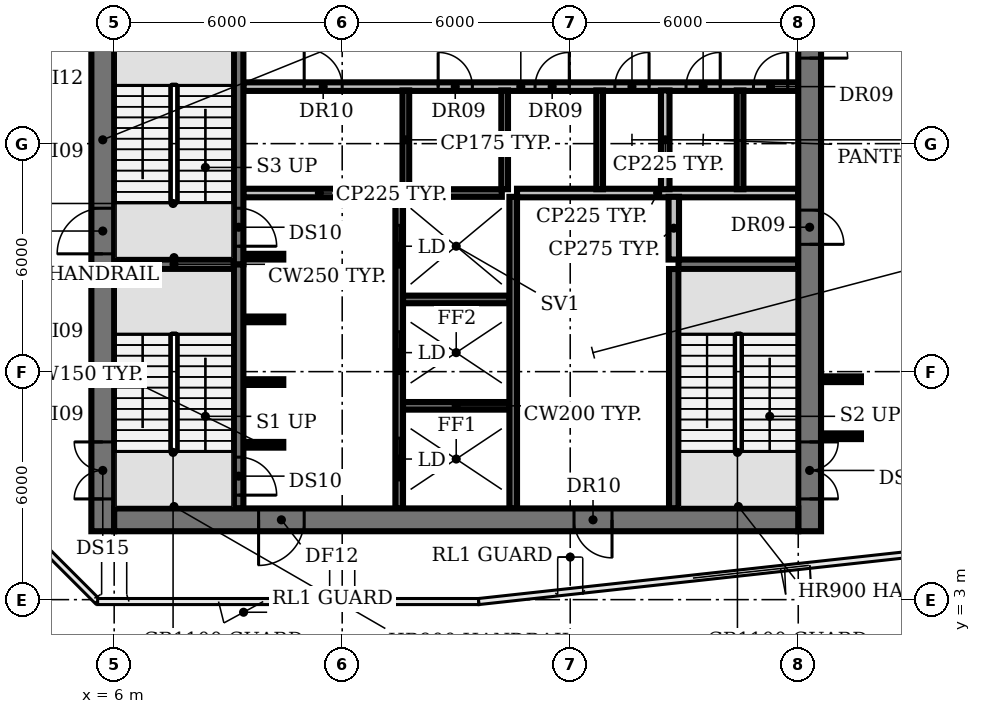
"""IFC4 building model, lengths in metres.
Left out: names, types, materials, properties, quantities, classifications, styles, units other than length and angle.
Written with IfcOpenShell. Run it as: python <this file> out.ifc"""

import sys

from ifc_helpers import new_model, si_unit, direction, frame, frame_2d, origin, place, context, subcontext, project, spatial, rectangle, extrude, element, fill, save


model = new_model("IFC4")
c1 = context("Model", 3, precision=1e-05, world=origin(), true_north=direction((0.0, 1.0)))
c2 = subcontext(c1, "Body", "Model", "MODEL_VIEW")
j1 = project(units=[si_unit("LENGTHUNIT", "METRE"), si_unit("PLANEANGLEUNIT", "RADIAN")], contexts=[c1])
p1 = place(None, origin())
s1 = spatial("IfcSite", under=j1, at=p1, CompositionType="ELEMENT")
p2 = place(p1, origin())
s2 = spatial("IfcBuilding", under=s1, at=p2, CompositionType="ELEMENT")
p3 = place(p2, frame((0.0, 0.0, 197.0)))
s3 = spatial("IfcBuildingStorey", under=s2, at=p3, CompositionType="ELEMENT", Elevation=197.0)
p4 = place(p3, frame((9.4, 7.075, 0.0), z_axis=(0.0, 0.0, 1.0), x_axis=(1.0, 0.0, 0.0)))
e1 = element("IfcWall", 1, at=p4, inside=s3, PredefinedType="SHEAR", context=c2, shape_type="SweptSolid", body=[
    extrude(rectangle(XDim=1.05, YDim=0.15, at=frame_2d((0.525, 0.0))), origin(), (0.0, 0.0, 1.0), 8.05),
])
p5 = place(p3, frame((13.6, 8.1, 0.0), z_axis=(0.0, 0.0, 1.0), x_axis=(1.0, 0.0, 0.0)))
e2 = element("IfcWall", 2, at=p5, inside=s3, PredefinedType="SHEAR", context=c2, shape_type="SweptSolid", body=[
    extrude(rectangle(XDim=2.8, YDim=0.2, at=frame_2d((1.4, 0.0))), origin(), (0.0, 0.0, 1.0), 8.05),
])
for number, where, z_axis, x_axis in (
    (3, (9.4, 8.725, 0.0), (0.0, 0.0, 1.0), (1.0, 0.0, 0.0)),
    (4, (9.4, 10.375, 0.0), (0.0, 0.0, 1.0), (1.0, 0.0, 0.0)),
):
    element("IfcWall", number, at=place(p3, frame(where, z_axis=z_axis, x_axis=x_axis)), inside=s3, PredefinedType="SHEAR", context=c2, shape_type="SweptSolid", body=[
        extrude(rectangle(XDim=1.05, YDim=0.15, at=frame_2d((0.525, 0.0))), origin(), (0.0, 0.0, 1.0), 8.05),
    ])
p6 = place(p3, frame((13.6, 10.9, 0.0), z_axis=(0.0, 0.0, 1.0), x_axis=(1.0, 0.0, 0.0)))
e5 = element("IfcWall", 5, at=p6, inside=s3, PredefinedType="SHEAR", context=c2, shape_type="SweptSolid", body=[
    extrude(rectangle(XDim=2.8, YDim=0.2, at=frame_2d((1.4, 0.0))), origin(), (0.0, 0.0, 1.0), 8.05),
])
for number, where, z_axis, x_axis in (
    (6, (6.0, 11.825, 0.0), (0.0, 0.0, 1.0), (1.0, 0.0, 0.0)),
    (7, (20.85, 11.825, 0.0), (0.0, 0.0, 1.0), (1.0, 0.0, 0.0)),
):
    element("IfcWall", number, at=place(p3, frame(where, z_axis=z_axis, x_axis=x_axis)), inside=s3, PredefinedType="SHEAR", context=c2, shape_type="SweptSolid", body=[
        extrude(rectangle(XDim=3.15, YDim=0.25, at=frame_2d((1.575, 0.0))), origin(), (0.0, 0.0, 1.0), 8.05),
    ])
p7 = place(p3, frame((9.4, 12.025, 0.0), z_axis=(0.0, 0.0, 1.0), x_axis=(1.0, 0.0, 0.0)))
e8 = element("IfcWall", 8, at=p7, inside=s3, PredefinedType="SHEAR", context=c2, shape_type="SweptSolid", body=[
    extrude(rectangle(XDim=1.05, YDim=0.15, at=frame_2d((0.525, 0.0))), origin(), (0.0, 0.0, 1.0), 8.05),
])
p8 = place(p3, frame((9.4, 13.7, 0.0), z_axis=(0.0, 0.0, 1.0), x_axis=(1.0, 0.0, 0.0)))
e9 = element("IfcWall", 9, at=p8, inside=s3, PredefinedType="PARTITIONING", context=c2, shape_type="SweptSolid", body=[
    extrude(rectangle(XDim=4.0, YDim=0.225, at=frame_2d((2.0, 0.0))), origin(), (0.0, 0.0, 1.0), 8.05),
])
p9 = place(p3, frame((13.75, 13.7, 0.0), z_axis=(0.0, 0.0, 1.0), x_axis=(1.0, 0.0, 0.0)))
e10 = element("IfcWall", 10, at=p9, inside=s3, PredefinedType="SHEAR", context=c2, shape_type="SweptSolid", body=[
    extrude(rectangle(XDim=2.45, YDim=0.2, at=frame_2d((1.225, 0.0))), origin(), (0.0, 0.0, 1.0), 8.05),
])
p10 = place(p3, frame((16.6, 13.7, 0.0), z_axis=(0.0, 0.0, 1.0), x_axis=(1.0, 0.0, 0.0)))
e11 = element("IfcWall", 11, at=p10, inside=s3, PredefinedType="PARTITIONING", context=c2, shape_type="SweptSolid", body=[
    extrude(rectangle(XDim=7.4, YDim=0.225, at=frame_2d((3.7, 0.0))), origin(), (0.0, 0.0, 1.0), 8.05),
])
p11 = place(p3, frame((9.4, 16.5, 0.0), z_axis=(0.0, 0.0, 1.0), x_axis=(1.0, 0.0, 0.0)))
e12 = element("IfcWall", 12, at=p11, inside=s3, PredefinedType="PARTITIONING", context=c2, shape_type="SweptSolid", body=[
    extrude(rectangle(XDim=14.6, YDim=0.225, at=frame_2d((7.3, 0.0))), origin(), (0.0, 0.0, 1.0), 8.05),
])
p12 = place(p11, frame((1.6, 0.0, 0.0)))
e13 = element("IfcOpeningElement", 13, at=p12, cuts=e12, PredefinedType="OPENING", context=c2, shape_type="SweptSolid", body=[
    extrude(rectangle(XDim=1.0, YDim=2.1, at=frame_2d((0.5, 1.05))), frame((0.0, 0.123, 0.0), z_axis=(0.0, -1.0, 0.0), x_axis=(1.0, 0.0, 0.0)), (0.0, 0.0, 1.0), 0.245),
])
p13 = place(p11, frame((5.125, 0.0, 0.0)))
e14 = element("IfcOpeningElement", 14, at=p13, cuts=e12, PredefinedType="OPENING", context=c2, shape_type="SweptSolid", body=[
    extrude(rectangle(XDim=0.9, YDim=2.1, at=frame_2d((0.45, 1.05))), frame((0.0, 0.123, 0.0), z_axis=(0.0, -1.0, 0.0), x_axis=(1.0, 0.0, 0.0)), (0.0, 0.0, 1.0), 0.245),
])
p14 = place(p11, frame((7.675, 0.0, 0.0)))
e15 = element("IfcOpeningElement", 15, at=p14, cuts=e12, PredefinedType="OPENING", context=c2, shape_type="SweptSolid", body=[
    extrude(rectangle(XDim=0.9, YDim=2.1, at=frame_2d((0.45, 1.05))), frame((0.0, 0.123, 0.0), z_axis=(0.0, -1.0, 0.0), x_axis=(1.0, 0.0, 0.0)), (0.0, 0.0, 1.0), 0.245),
])
p15 = place(p11, frame((9.775, 0.0, 0.0)))
e16 = element("IfcOpeningElement", 16, at=p15, cuts=e12, PredefinedType="OPENING", context=c2, shape_type="SweptSolid", body=[
    extrude(rectangle(XDim=0.9, YDim=2.1, at=frame_2d((0.45, 1.05))), frame((0.0, 0.123, 0.0), z_axis=(0.0, -1.0, 0.0), x_axis=(1.0, 0.0, 0.0)), (0.0, 0.0, 1.0), 0.245),
])
p16 = place(p11, frame((11.647, 0.0, 0.0)))
e17 = element("IfcOpeningElement", 17, at=p16, cuts=e12, PredefinedType="OPENING", context=c2, shape_type="SweptSolid", body=[
    extrude(rectangle(XDim=0.9, YDim=2.1, at=frame_2d((0.45, 1.05))), frame((0.0, 0.123, 0.0), z_axis=(0.0, -1.0, 0.0), x_axis=(1.0, 0.0, 0.0)), (0.0, 0.0, 1.0), 0.245),
])
p17 = place(p11, frame((13.423, 0.0, 0.0)))
e18 = element("IfcOpeningElement", 18, at=p17, cuts=e12, PredefinedType="OPENING", context=c2, shape_type="SweptSolid", body=[
    extrude(rectangle(XDim=0.9, YDim=2.1, at=frame_2d((0.45, 1.05))), frame((0.0, 0.123, 0.0), z_axis=(0.0, -1.0, 0.0), x_axis=(1.0, 0.0, 0.0)), (0.0, 0.0, 1.0), 0.245),
])
p18 = place(p3, frame((9.275, 11.825, 0.0), z_axis=(0.0, 0.0, 1.0), x_axis=(0.0, -1.0, 0.0)))
e19 = element("IfcWall", 19, at=p18, inside=s3, PredefinedType="SHEAR", context=c2, shape_type="SweptSolid", body=[
    extrude(rectangle(XDim=6.425, YDim=0.25, at=frame_2d((3.212, 0.0))), origin(), (0.0, 0.0, 1.0), 8.05),
])
p19 = place(p18, frame((5.075, 0.0, 0.0)))
e20 = element("IfcOpeningElement", 20, at=p19, cuts=e19, PredefinedType="OPENING", context=c2, shape_type="SweptSolid", body=[
    extrude(rectangle(XDim=1.0, YDim=2.1, at=frame_2d((0.5, 1.05))), frame((0.0, 0.135, 0.0), z_axis=(0.0, -1.0, 0.0), x_axis=(1.0, 0.0, 0.0)), (0.0, 0.0, 1.0), 0.27),
])
p20 = place(p3, frame((9.275, 18.375, 0.0), z_axis=(0.0, 0.0, 1.0), x_axis=(0.0, -1.0, 0.0)))
e21 = element("IfcWall", 21, at=p20, inside=s3, PredefinedType="SHEAR", context=c2, shape_type="SweptSolid", body=[
    extrude(rectangle(XDim=6.55, YDim=0.25, at=frame_2d((3.275, 0.0))), origin(), (0.0, 0.0, 1.0), 8.05),
])
p21 = place(p20, frame((5.075, 0.0, 0.0)))
e22 = element("IfcOpeningElement", 22, at=p21, cuts=e21, PredefinedType="OPENING", context=c2, shape_type="SweptSolid", body=[
    extrude(rectangle(XDim=1.0, YDim=2.1, at=frame_2d((0.5, 1.05))), frame((0.0, 0.135, 0.0), z_axis=(0.0, -1.0, 0.0), x_axis=(1.0, 0.0, 0.0)), (0.0, 0.0, 1.0), 0.27),
])
p22 = place(p3, frame((13.5, 5.4, 0.0), z_axis=(0.0, 0.0, 1.0), x_axis=(0.0, 1.0, 0.0)))
e23 = element("IfcWall", 23, at=p22, inside=s3, PredefinedType="SHEAR", context=c2, shape_type="SweptSolid", body=[
    extrude(rectangle(XDim=8.2, YDim=0.2, at=frame_2d((4.1, 0.0))), origin(), (0.0, 0.0, 1.0), 8.05),
])
p23 = place(p22, frame((0.75, 0.0, 0.0)))
e24 = element("IfcOpeningElement", 24, at=p23, cuts=e23, PredefinedType="OPENING", context=c2, shape_type="SweptSolid", body=[
    extrude(rectangle(XDim=1.1, YDim=2.1, at=frame_2d((0.55, 1.05))), frame((0.0, 0.11, 0.0), z_axis=(0.0, -1.0, 0.0), x_axis=(1.0, 0.0, 0.0)), (0.0, 0.0, 1.0), 0.22),
])
p24 = place(p22, frame((3.55, 0.0, 0.0)))
e25 = element("IfcOpeningElement", 25, at=p24, cuts=e23, PredefinedType="OPENING", context=c2, shape_type="SweptSolid", body=[
    extrude(rectangle(XDim=1.1, YDim=2.1, at=frame_2d((0.55, 1.05))), frame((0.0, 0.11, 0.0), z_axis=(0.0, -1.0, 0.0), x_axis=(1.0, 0.0, 0.0)), (0.0, 0.0, 1.0), 0.22),
])
p25 = place(p22, frame((6.35, 0.0, 0.0)))
e26 = element("IfcOpeningElement", 26, at=p25, cuts=e23, PredefinedType="OPENING", context=c2, shape_type="SweptSolid", body=[
    extrude(rectangle(XDim=1.1, YDim=2.1, at=frame_2d((0.55, 1.05))), frame((0.0, 0.11, 0.0), z_axis=(0.0, -1.0, 0.0), x_axis=(1.0, 0.0, 0.0)), (0.0, 0.0, 1.0), 0.22),
])
for number, where, z_axis, x_axis in (
    (27, (13.675, 13.8, 0.0), (0.0, 0.0, 1.0), (0.0, 1.0, 0.0)),
    (28, (16.275, 13.8, 0.0), (0.0, 0.0, 1.0), (0.0, 1.0, 0.0)),
):
    element("IfcWall", number, at=place(p3, frame(where, z_axis=z_axis, x_axis=x_axis)), inside=s3, PredefinedType="PARTITIONING", context=c2, shape_type="SweptSolid", body=[
        extrude(rectangle(XDim=2.6, YDim=0.175, at=frame_2d((1.3, 0.0))), origin(), (0.0, 0.0, 1.0), 8.05),
    ])
p26 = place(p3, frame((16.5, 5.4, 0.0), z_axis=(0.0, 0.0, 1.0), x_axis=(0.0, 1.0, 0.0)))
e29 = element("IfcWall", 29, at=p26, inside=s3, PredefinedType="SHEAR", context=c2, shape_type="SweptSolid", body=[
    extrude(rectangle(XDim=8.2, YDim=0.2, at=frame_2d((4.1, 0.0))), origin(), (0.0, 0.0, 1.0), 8.05),
])
p27 = place(p3, frame((18.775, 13.8, 0.0), z_axis=(0.0, 0.0, 1.0), x_axis=(0.0, 1.0, 0.0)))
e30 = element("IfcWall", 30, at=p27, inside=s3, PredefinedType="PARTITIONING", context=c2, shape_type="SweptSolid", body=[
    extrude(rectangle(XDim=2.6, YDim=0.175, at=frame_2d((1.3, 0.0))), origin(), (0.0, 0.0, 1.0), 8.05),
])
p28 = place(p3, frame((20.5, 13.8, 0.0), z_axis=(0.0, 0.0, 1.0), x_axis=(0.0, 1.0, 0.0)))
e31 = element("IfcWall", 31, at=p28, inside=s3, PredefinedType="PARTITIONING", context=c2, shape_type="SweptSolid", body=[
    extrude(rectangle(XDim=2.6, YDim=0.225, at=frame_2d((1.3, 0.0))), origin(), (0.0, 0.0, 1.0), 8.05),
])
p29 = place(p3, frame((20.725, 5.4, 0.0), z_axis=(0.0, 0.0, 1.0), x_axis=(0.0, 1.0, 0.0)))
e32 = element("IfcWall", 32, at=p29, inside=s3, PredefinedType="SHEAR", context=c2, shape_type="SweptSolid", body=[
    extrude(rectangle(XDim=6.3, YDim=0.25, at=frame_2d((3.15, 0.0))), origin(), (0.0, 0.0, 1.0), 8.05),
])
p30 = place(p3, frame((20.725, 11.95, 0.0), z_axis=(0.0, 0.0, 1.0), x_axis=(0.0, 1.0, 0.0)))
e33 = element("IfcWall", 33, at=p30, inside=s3, PredefinedType="PARTITIONING", context=c2, shape_type="SweptSolid", body=[
    extrude(rectangle(XDim=1.65, YDim=0.275, at=frame_2d((0.825, 0.0))), origin(), (0.0, 0.0, 1.0), 8.05),
])
p31 = place(p3, frame((22.47, 13.8, 0.0), z_axis=(0.0, 0.0, 1.0), x_axis=(0.0, 1.0, 0.0)))
e34 = element("IfcWall", 34, at=p31, inside=s3, PredefinedType="PARTITIONING", context=c2, shape_type="SweptSolid", body=[
    extrude(rectangle(XDim=2.6, YDim=0.175, at=frame_2d((1.3, 0.0))), origin(), (0.0, 0.0, 1.0), 8.05),
])
p32 = place(p3, frame((5.7, 4.8, 0.0), z_axis=(0.0, 0.0, 1.0), x_axis=(0.0, 1.0, 0.0)))
e35 = element("IfcWall", 35, at=p32, inside=s3, PredefinedType="SHEAR", context=c2, shape_type="SweptSolid", body=[
    extrude(rectangle(XDim=20.6, YDim=0.6, at=frame_2d((10.3, 0.0))), origin(), (0.0, 0.0, 1.0), 8.05),
])
p33 = place(p32, frame((0.85, 0.0, 0.0)))
e36 = element("IfcOpeningElement", 36, at=p33, cuts=e35, PredefinedType="OPENING", context=c2, shape_type="SweptSolid", body=[
    extrude(rectangle(XDim=1.5, YDim=2.1, at=frame_2d((0.75, 1.05))), frame((0.0, 0.31, 0.0), z_axis=(0.0, -1.0, 0.0), x_axis=(1.0, 0.0, 0.0)), (0.0, 0.0, 1.0), 0.62),
])
p34 = place(p32, frame((7.3, 0.0, 0.0)))
e37 = element("IfcOpeningElement", 37, at=p34, cuts=e35, PredefinedType="OPENING", context=c2, shape_type="SweptSolid", body=[
    extrude(rectangle(XDim=1.2, YDim=2.1, at=frame_2d((0.6, 1.05))), frame((0.0, 0.31, 0.0), z_axis=(0.0, -1.0, 0.0), x_axis=(1.0, 0.0, 0.0)), (0.0, 0.0, 1.0), 0.62),
])
p35 = place(p32, frame((13.85, 0.0, 0.0)))
e38 = element("IfcOpeningElement", 38, at=p35, cuts=e35, PredefinedType="OPENING", context=c2, shape_type="SweptSolid", body=[
    extrude(rectangle(XDim=1.2, YDim=2.1, at=frame_2d((0.6, 1.05))), frame((0.0, 0.31, 0.0), z_axis=(0.0, -1.0, 0.0), x_axis=(1.0, 0.0, 0.0)), (0.0, 0.0, 1.0), 0.62),
])
p36 = place(p3, frame((24.3, 25.4, 0.0), z_axis=(0.0, 0.0, 1.0), x_axis=(0.0, -1.0, 0.0)))
e39 = element("IfcWall", 39, at=p36, inside=s3, PredefinedType="SHEAR", context=c2, shape_type="SweptSolid", body=[
    extrude(rectangle(XDim=20.6, YDim=0.6, at=frame_2d((10.3, 0.0))), origin(), (0.0, 0.0, 1.0), 8.05),
])
p37 = place(p36, frame((18.25, 0.0, 0.0)))
e40 = element("IfcOpeningElement", 40, at=p37, cuts=e39, PredefinedType="OPENING", context=c2, shape_type="SweptSolid", body=[
    extrude(rectangle(XDim=1.5, YDim=2.1, at=frame_2d((0.75, 1.05))), frame((0.0, 0.31, 0.0), z_axis=(0.0, -1.0, 0.0), x_axis=(1.0, 0.0, 0.0)), (0.0, 0.0, 1.0), 0.62),
])
p38 = place(p36, frame((12.15, 0.0, 0.0)))
e41 = element("IfcOpeningElement", 41, at=p38, cuts=e39, PredefinedType="OPENING", context=c2, shape_type="SweptSolid", body=[
    extrude(rectangle(XDim=0.9, YDim=2.1, at=frame_2d((0.45, 1.05))), frame((0.0, 0.31, 0.0), z_axis=(0.0, -1.0, 0.0), x_axis=(1.0, 0.0, 0.0)), (0.0, 0.0, 1.0), 0.62),
])
p39 = place(p36, frame((6.15, 0.0, 0.0)))
e42 = element("IfcOpeningElement", 42, at=p39, cuts=e39, PredefinedType="OPENING", context=c2, shape_type="SweptSolid", body=[
    extrude(rectangle(XDim=2.0, YDim=2.1, at=frame_2d((1.0, 1.05))), frame((0.0, 0.31, 0.0), z_axis=(0.0, -1.0, 0.0), x_axis=(1.0, 0.0, 0.0)), (0.0, 0.0, 1.0), 0.62),
])
p40 = place(p3, frame((24.0, 5.1, 0.0), z_axis=(0.0, 0.0, 1.0), x_axis=(-1.0, 0.0, 0.0)))
e43 = element("IfcWall", 43, at=p40, inside=s3, PredefinedType="SHEAR", context=c2, shape_type="SweptSolid", body=[
    extrude(rectangle(XDim=18.0, YDim=0.6, at=frame_2d((9.0, 0.0))), origin(), (0.0, 0.0, 1.0), 8.05),
])
p41 = place(p40, frame((13.0, 0.0, 0.0)))
e44 = element("IfcOpeningElement", 44, at=p41, cuts=e43, PredefinedType="OPENING", context=c2, shape_type="SweptSolid", body=[
    extrude(rectangle(XDim=1.2, YDim=2.1, at=frame_2d((0.6, 1.05))), frame((0.0, 0.31, 0.0), z_axis=(0.0, -1.0, 0.0), x_axis=(1.0, 0.0, 0.0)), (0.0, 0.0, 1.0), 0.62),
])
p42 = place(p40, frame((4.9, 0.0, 0.0)))
e45 = element("IfcOpeningElement", 45, at=p42, cuts=e43, PredefinedType="OPENING", context=c2, shape_type="SweptSolid", body=[
    extrude(rectangle(XDim=1.0, YDim=2.1, at=frame_2d((0.5, 1.05))), frame((0.0, 0.31, 0.0), z_axis=(0.0, -1.0, 0.0), x_axis=(1.0, 0.0, 0.0)), (0.0, 0.0, 1.0), 0.62),
])
for number, where, z_axis, x_axis in (
    (46, (24.6, 7.3, 0.0), (0.0, 0.0, 1.0), (1.0, 0.0, 0.0)),
    (47, (24.6, 8.8, 0.0), (0.0, 0.0, 1.0), (1.0, 0.0, 0.0)),
):
    element("IfcWall", number, at=place(p3, frame(where, z_axis=z_axis, x_axis=x_axis)), inside=s3, PredefinedType="PARTITIONING", context=c2, shape_type="SweptSolid", body=[
        extrude(rectangle(XDim=1.05, YDim=0.15, at=frame_2d((0.525, 0.0))), origin(), (0.0, 0.0, 1.0), 6.33),
    ])
p43 = place(p12, origin())
e48 = element("IfcDoor", 48, at=p43, inside=s3, OperationType="SINGLE_SWING_LEFT", PredefinedType="DOOR", context=c2, shape_type="SweptSolid", body=[
    extrude(rectangle(XDim=1.0, YDim=2.1, at=frame_2d((0.5, 1.05))), frame((0.0, 0.025, 0.0), z_axis=(0.0, -1.0, 0.0), x_axis=(1.0, 0.0, 0.0)), (0.0, 0.0, 1.0), 0.05),
])
fill(e13, e48)
p44 = place(p13, origin())
e49 = element("IfcDoor", 49, at=p44, inside=s3, OperationType="SINGLE_SWING_LEFT", PredefinedType="DOOR", context=c2, shape_type="SweptSolid", body=[
    extrude(rectangle(XDim=0.9, YDim=2.1, at=frame_2d((0.45, 1.05))), frame((0.0, 0.025, 0.0), z_axis=(0.0, -1.0, 0.0), x_axis=(1.0, 0.0, 0.0)), (0.0, 0.0, 1.0), 0.05),
])
fill(e14, e49)
p45 = place(p14, origin())
e50 = element("IfcDoor", 50, at=p45, inside=s3, OperationType="SINGLE_SWING_RIGHT", PredefinedType="DOOR", context=c2, shape_type="SweptSolid", body=[
    extrude(rectangle(XDim=0.9, YDim=2.1, at=frame_2d((0.45, 1.05))), frame((0.0, 0.025, 0.0), z_axis=(0.0, -1.0, 0.0), x_axis=(1.0, 0.0, 0.0)), (0.0, 0.0, 1.0), 0.05),
])
fill(e15, e50)
p46 = place(p15, origin())
e51 = element("IfcDoor", 51, at=p46, inside=s3, OperationType="SINGLE_SWING_RIGHT", PredefinedType="DOOR", context=c2, shape_type="SweptSolid", body=[
    extrude(rectangle(XDim=0.9, YDim=2.1, at=frame_2d((0.45, 1.05))), frame((0.0, 0.025, 0.0), z_axis=(0.0, -1.0, 0.0), x_axis=(1.0, 0.0, 0.0)), (0.0, 0.0, 1.0), 0.05),
])
fill(e16, e51)
p47 = place(p16, origin())
e52 = element("IfcDoor", 52, at=p47, inside=s3, OperationType="SINGLE_SWING_RIGHT", PredefinedType="DOOR", context=c2, shape_type="SweptSolid", body=[
    extrude(rectangle(XDim=0.9, YDim=2.1, at=frame_2d((0.45, 1.05))), frame((0.0, 0.025, 0.0), z_axis=(0.0, -1.0, 0.0), x_axis=(1.0, 0.0, 0.0)), (0.0, 0.0, 1.0), 0.05),
])
fill(e17, e52)
p48 = place(p17, origin())
e53 = element("IfcDoor", 53, at=p48, inside=s3, OperationType="SINGLE_SWING_RIGHT", PredefinedType="DOOR", context=c2, shape_type="SweptSolid", body=[
    extrude(rectangle(XDim=0.9, YDim=2.1, at=frame_2d((0.45, 1.05))), frame((0.0, 0.025, 0.0), z_axis=(0.0, -1.0, 0.0), x_axis=(1.0, 0.0, 0.0)), (0.0, 0.0, 1.0), 0.05),
])
fill(e18, e53)
p49 = place(p19, origin())
e54 = element("IfcDoor", 54, at=p49, inside=s3, OperationType="SINGLE_SWING_RIGHT", PredefinedType="DOOR", context=c2, shape_type="SweptSolid", body=[
    extrude(rectangle(XDim=1.0, YDim=2.1, at=frame_2d((0.5, 1.05))), frame((0.0, 0.025, 0.0), z_axis=(0.0, -1.0, 0.0), x_axis=(1.0, 0.0, 0.0)), (0.0, 0.0, 1.0), 0.05),
])
fill(e20, e54)
p50 = place(p21, origin())
e55 = element("IfcDoor", 55, at=p50, inside=s3, OperationType="SINGLE_SWING_RIGHT", PredefinedType="DOOR", context=c2, shape_type="SweptSolid", body=[
    extrude(rectangle(XDim=1.0, YDim=2.1, at=frame_2d((0.5, 1.05))), frame((0.0, 0.025, 0.0), z_axis=(0.0, -1.0, 0.0), x_axis=(1.0, 0.0, 0.0)), (0.0, 0.0, 1.0), 0.05),
])
fill(e22, e55)
p51 = place(p23, origin())
e56 = element("IfcDoor", 56, at=p51, inside=s3, OperationType="DOUBLE_DOOR_SLIDING", PredefinedType="DOOR", context=c2, shape_type="SweptSolid", body=[
    extrude(rectangle(XDim=1.1, YDim=2.1, at=frame_2d((0.55, 1.05))), frame((0.0, 0.025, 0.0), z_axis=(0.0, -1.0, 0.0), x_axis=(1.0, 0.0, 0.0)), (0.0, 0.0, 1.0), 0.05),
])
fill(e24, e56)
p52 = place(p24, origin())
e57 = element("IfcDoor", 57, at=p52, inside=s3, OperationType="DOUBLE_DOOR_SLIDING", PredefinedType="DOOR", context=c2, shape_type="SweptSolid", body=[
    extrude(rectangle(XDim=1.1, YDim=2.1, at=frame_2d((0.55, 1.05))), frame((0.0, 0.025, 0.0), z_axis=(0.0, -1.0, 0.0), x_axis=(1.0, 0.0, 0.0)), (0.0, 0.0, 1.0), 0.05),
])
fill(e25, e57)
p53 = place(p25, origin())
e58 = element("IfcDoor", 58, at=p53, inside=s3, OperationType="DOUBLE_DOOR_SLIDING", PredefinedType="DOOR", context=c2, shape_type="SweptSolid", body=[
    extrude(rectangle(XDim=1.1, YDim=2.1, at=frame_2d((0.55, 1.05))), frame((0.0, 0.025, 0.0), z_axis=(0.0, -1.0, 0.0), x_axis=(1.0, 0.0, 0.0)), (0.0, 0.0, 1.0), 0.05),
])
fill(e26, e58)
p54 = place(p33, origin())
e59 = element("IfcDoor", 59, at=p54, inside=s3, OperationType="DOUBLE_DOOR_SINGLE_SWING", PredefinedType="DOOR", context=c2, shape_type="SweptSolid", body=[
    extrude(rectangle(XDim=1.5, YDim=2.1, at=frame_2d((0.75, 1.05))), frame((0.0, 0.025, 0.0), z_axis=(0.0, -1.0, 0.0), x_axis=(1.0, 0.0, 0.0)), (0.0, 0.0, 1.0), 0.05),
])
fill(e36, e59)
p55 = place(p34, origin())
e60 = element("IfcDoor", 60, at=p55, inside=s3, OperationType="SINGLE_SWING_LEFT", PredefinedType="DOOR", context=c2, shape_type="SweptSolid", body=[
    extrude(rectangle(XDim=1.2, YDim=2.1, at=frame_2d((0.6, 1.05))), frame((0.0, 0.025, 0.0), z_axis=(0.0, -1.0, 0.0), x_axis=(1.0, 0.0, 0.0)), (0.0, 0.0, 1.0), 0.05),
])
fill(e37, e60)
p56 = place(p37, origin())
e61 = element("IfcDoor", 61, at=p56, inside=s3, OperationType="DOUBLE_DOOR_SINGLE_SWING", PredefinedType="DOOR", context=c2, shape_type="SweptSolid", body=[
    extrude(rectangle(XDim=1.5, YDim=2.1, at=frame_2d((0.75, 1.05))), frame((0.0, 0.025, 0.0), z_axis=(0.0, -1.0, 0.0), x_axis=(1.0, 0.0, 0.0)), (0.0, 0.0, 1.0), 0.05),
])
fill(e40, e61)
p57 = place(p38, origin())
e62 = element("IfcDoor", 62, at=p57, inside=s3, OperationType="SINGLE_SWING_RIGHT", PredefinedType="DOOR", context=c2, shape_type="SweptSolid", body=[
    extrude(rectangle(XDim=0.9, YDim=2.1, at=frame_2d((0.45, 1.05))), frame((0.0, -0.24, 0.0), z_axis=(0.0, -1.0, 0.0), x_axis=(1.0, 0.0, 0.0)), (0.0, 0.0, 1.0), 0.05),
])
fill(e41, e62)
p58 = place(p39, origin())
e63 = element("IfcDoor", 63, at=p58, inside=s3, OperationType="DOUBLE_DOOR_SINGLE_SWING", PredefinedType="DOOR", context=c2, shape_type="SweptSolid", body=[
    extrude(rectangle(XDim=2.0, YDim=2.1, at=frame_2d((1.0, 1.05))), frame((0.0, 0.025, 0.0), z_axis=(0.0, -1.0, 0.0), x_axis=(1.0, 0.0, 0.0)), (0.0, 0.0, 1.0), 0.05),
])
fill(e42, e63)
p59 = place(p41, origin())
e64 = element("IfcDoor", 64, at=p59, inside=s3, OperationType="SINGLE_SWING_RIGHT", PredefinedType="DOOR", context=c2, shape_type="SweptSolid", body=[
    extrude(rectangle(XDim=1.2, YDim=2.1, at=frame_2d((0.6, 1.05))), frame((0.0, 0.025, 0.0), z_axis=(0.0, -1.0, 0.0), x_axis=(1.0, 0.0, 0.0)), (0.0, 0.0, 1.0), 0.05),
])
fill(e44, e64)
p60 = place(p42, origin())
e65 = element("IfcDoor", 65, at=p60, inside=s3, OperationType="SINGLE_SWING_LEFT", PredefinedType="DOOR", context=c2, shape_type="SweptSolid", body=[
    extrude(rectangle(XDim=1.0, YDim=2.1, at=frame_2d((0.5, 1.05))), frame((0.0, -0.24, 0.0), z_axis=(0.0, -1.0, 0.0), x_axis=(1.0, 0.0, 0.0)), (0.0, 0.0, 1.0), 0.05),
])
fill(e45, e65)
save(model, sys.argv[1])
